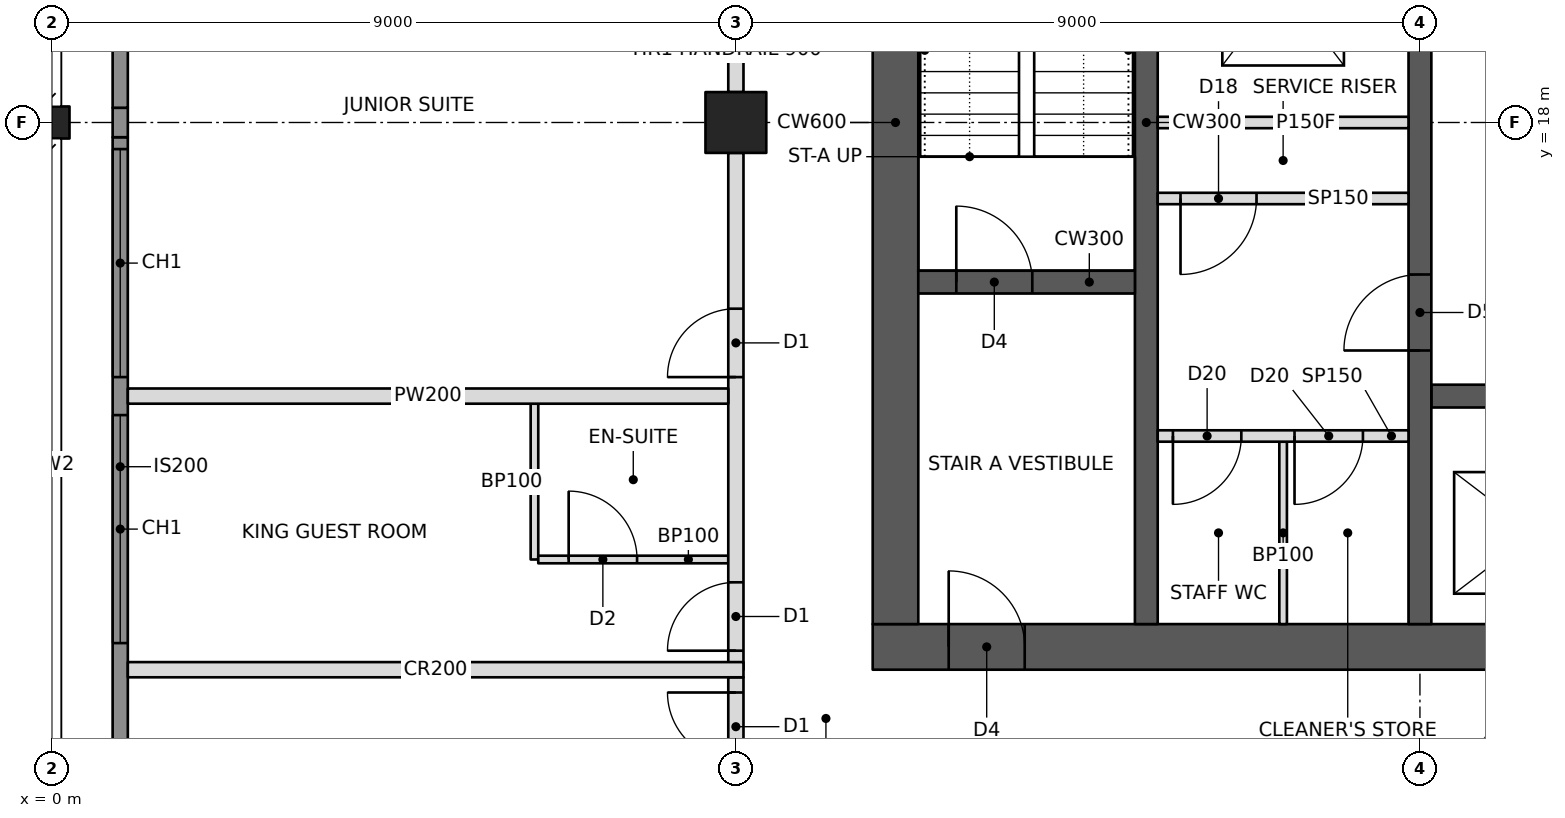
"""IFC4 building model, lengths in metres.
Left out: names, types, materials, properties, quantities, classifications, styles, units other than length and angle.
Written with IfcOpenShell. Run it as: python <this file> out.ifc"""

import sys

from ifc_helpers import new_model, si_unit, direction, frame, frame_2d, origin, origin_2d, place, context, subcontext, project, spatial, rectangle, hollow_rectangle, i_section, extrude, element, fill, save


model = new_model("IFC4")
c1 = context("Model", 3, precision=1e-05, world=origin(), true_north=direction((0.0, 1.0)))
c2 = subcontext(c1, "Body", "Model", "MODEL_VIEW")
j1 = project(units=[si_unit("LENGTHUNIT", "METRE"), si_unit("PLANEANGLEUNIT", "RADIAN")], contexts=[c1])
p1 = place(None, origin())
s1 = spatial("IfcSite", under=j1, at=p1, CompositionType="ELEMENT")
p2 = place(p1, origin())
s2 = spatial("IfcBuilding", under=s1, at=p2, CompositionType="ELEMENT")
p3 = place(p2, frame((0.0, 0.0, 244.6)))
s3 = spatial("IfcBuildingStorey", under=s2, at=p3, CompositionType="ELEMENT", Elevation=244.6)
p4 = place(p3, frame((0.0, 18.0, 0.0), z_axis=(0.0, 0.0, 1.0), x_axis=(0.0, 1.0, 0.0)))
e1 = element("IfcColumn", 1, at=p4, inside=s3, PredefinedType="COLUMN", context=c2, shape_type="SweptSolid", body=[
    extrude(i_section(OverallWidth=0.422, OverallDepth=0.465, WebThickness=0.045, FlangeThickness=0.073, at=origin_2d()), origin(), (0.0, 0.0, 1.0), 3.6),
])
p5 = place(p3, frame((9.0, 18.0, 0.0), z_axis=(0.0, 0.0, 1.0), x_axis=(1.0, 0.0, 0.0)))
e2 = element("IfcColumn", 2, at=p5, inside=s3, PredefinedType="COLUMN", context=c2, shape_type="SweptSolid", body=[
    extrude(hollow_rectangle(XDim=0.8, YDim=0.8, WallThickness=0.04, at=origin_2d()), origin(), (0.0, 0.0, 1.0), 3.6),
])
p6 = place(p3, frame((10.8, 11.1, 0.0), z_axis=(0.0, 0.0, 1.0), x_axis=(1.0, 0.0, 0.0)))
e3 = element("IfcWall", 3, at=p6, inside=s3, PredefinedType="SHEAR", context=c2, shape_type="SweptSolid", body=[
    extrude(rectangle(XDim=23.4, YDim=0.6, at=frame_2d((11.7, 0.0))), origin(), (0.0, 0.0, 1.0), 3.6),
])
p7 = place(p6, frame((1.0, 0.0, 0.0)))
e4 = element("IfcOpeningElement", 4, at=p7, cuts=e3, PredefinedType="OPENING", context=c2, shape_type="SweptSolid", body=[
    extrude(rectangle(XDim=1.0, YDim=2.1, at=frame_2d((0.5, 1.05))), frame((0.0, 0.31, 0.0), z_axis=(0.0, -1.0, 0.0), x_axis=(1.0, 0.0, 0.0)), (0.0, 0.0, 1.0), 0.62),
])
p8 = place(p6, frame((17.2, 0.0, 0.0)))
e5 = element("IfcOpeningElement", 5, at=p8, cuts=e3, PredefinedType="OPENING", context=c2, shape_type="SweptSolid", body=[
    extrude(rectangle(XDim=1.8, YDim=2.1, at=frame_2d((0.9, 1.05))), frame((0.0, 0.31, 0.0), z_axis=(0.0, -1.0, 0.0), x_axis=(1.0, 0.0, 0.0)), (0.0, 0.0, 1.0), 0.62),
])
p9 = place(p3, frame((11.1, 11.4, 0.0), z_axis=(0.0, 0.0, 1.0), x_axis=(0.0, 1.0, 0.0)))
e6 = element("IfcWall", 6, at=p9, inside=s3, PredefinedType="SHEAR", context=c2, shape_type="SweptSolid", body=[
    extrude(rectangle(XDim=13.2, YDim=0.6, at=frame_2d((6.6, 0.0))), origin(), (0.0, 0.0, 1.0), 3.6),
])
p10 = place(p3, frame((14.4, 11.4, 0.0), z_axis=(0.0, 0.0, 1.0), x_axis=(0.0, 1.0, 0.0)))
e7 = element("IfcWall", 7, at=p10, inside=s3, PredefinedType="SHEAR", context=c2, shape_type="SweptSolid", body=[
    extrude(rectangle(XDim=13.2, YDim=0.3, at=frame_2d((6.6, 0.0))), origin(), (0.0, 0.0, 1.0), 3.6),
])
p11 = place(p3, frame((11.4, 15.9, 0.0), z_axis=(0.0, 0.0, 1.0), x_axis=(1.0, 0.0, 0.0)))
e8 = element("IfcWall", 8, at=p11, inside=s3, PredefinedType="SHEAR", context=c2, shape_type="SweptSolid", body=[
    extrude(rectangle(XDim=2.85, YDim=0.3, at=frame_2d((1.425, 0.0))), origin(), (0.0, 0.0, 1.0), 3.6),
])
p12 = place(p11, frame((0.5, 0.0, 0.0)))
e9 = element("IfcOpeningElement", 9, at=p12, cuts=e8, PredefinedType="OPENING", context=c2, shape_type="SweptSolid", body=[
    extrude(rectangle(XDim=1.0, YDim=2.1, at=frame_2d((0.5, 1.05))), frame((0.0, 0.16, 0.0), z_axis=(0.0, -1.0, 0.0), x_axis=(1.0, 0.0, 0.0)), (0.0, 0.0, 1.0), 0.32),
])
p13 = place(p3, frame((18.0, 11.4, 0.0), z_axis=(0.0, 0.0, 1.0), x_axis=(0.0, 1.0, 0.0)))
e10 = element("IfcWall", 10, at=p13, inside=s3, PredefinedType="SHEAR", context=c2, shape_type="SweptSolid", body=[
    extrude(rectangle(XDim=13.2, YDim=0.3, at=frame_2d((6.6, 0.0))), origin(), (0.0, 0.0, 1.0), 3.6),
])
p14 = place(p13, frame((3.6, 0.0, 0.0)))
e11 = element("IfcOpeningElement", 11, at=p14, cuts=e10, PredefinedType="OPENING", context=c2, shape_type="SweptSolid", body=[
    extrude(rectangle(XDim=1.0, YDim=2.1, at=frame_2d((0.5, 1.05))), frame((0.0, 0.16, 0.0), z_axis=(0.0, -1.0, 0.0), x_axis=(1.0, 0.0, 0.0)), (0.0, 0.0, 1.0), 0.32),
])
p15 = place(p13, frame((7.85, 0.0, 0.0)))
e12 = element("IfcOpeningElement", 12, at=p15, cuts=e10, PredefinedType="OPENING", context=c2, shape_type="SweptSolid", body=[
    extrude(rectangle(XDim=1.1, YDim=2.1, at=frame_2d((0.55, 1.05))), frame((0.0, 0.16, 0.0), z_axis=(0.0, -1.0, 0.0), x_axis=(1.0, 0.0, 0.0)), (0.0, 0.0, 1.0), 0.32),
])
p16 = place(p3, frame((14.55, 18.0, 0.0), z_axis=(0.0, 0.0, 1.0), x_axis=(1.0, 0.0, 0.0)))
e13 = element("IfcWall", 13, at=p16, inside=s3, PredefinedType="PARTITIONING", context=c2, shape_type="SweptSolid", body=[
    extrude(rectangle(XDim=3.3, YDim=0.15, at=frame_2d((1.65, 0.0))), origin(), (0.0, 0.0, 1.0), 3.4),
])
p17 = place(p3, frame((18.15, 14.4, 0.0), z_axis=(0.0, 0.0, 1.0), x_axis=(1.0, 0.0, 0.0)))
e14 = element("IfcWall", 14, at=p17, inside=s3, PredefinedType="SHEAR", context=c2, shape_type="SweptSolid", body=[
    extrude(rectangle(XDim=9.0, YDim=0.3, at=frame_2d((4.5, 0.0))), origin(), (0.0, 0.0, 1.0), 3.6),
])
p18 = place(p17, frame((0.8, 0.0, 0.0)))
e15 = element("IfcOpeningElement", 15, at=p18, cuts=e14, PredefinedType="OPENING", context=c2, shape_type="SweptSolid", body=[
    extrude(rectangle(XDim=1.1, YDim=2.1, at=frame_2d((0.55, 1.05))), frame((0.0, 0.16, 0.0), z_axis=(0.0, -1.0, 0.0), x_axis=(1.0, 0.0, 0.0)), (0.0, 0.0, 1.0), 0.32),
])
p19 = place(p17, frame((6.75, 0.0, 0.0)))
e16 = element("IfcOpeningElement", 16, at=p19, cuts=e14, PredefinedType="OPENING", context=c2, shape_type="SweptSolid", body=[
    extrude(rectangle(XDim=1.2, YDim=2.1, at=frame_2d((0.6, 1.05))), frame((0.0, 0.16, 0.0), z_axis=(0.0, -1.0, 0.0), x_axis=(1.0, 0.0, 0.0)), (0.0, 0.0, 1.0), 0.32),
])
p20 = place(p17, frame((3.8, 0.0, 0.0)))
e17 = element("IfcOpeningElement", 17, at=p20, cuts=e14, PredefinedType="OPENING", context=c2, shape_type="SweptSolid", body=[
    extrude(rectangle(XDim=1.1, YDim=2.1, at=frame_2d((0.55, 1.05))), frame((0.0, 0.16, 0.0), z_axis=(0.0, -1.0, 0.0), x_axis=(1.0, 0.0, 0.0)), (0.0, 0.0, 1.0), 0.32),
])
p21 = place(p3, frame((9.0, 10.8, 0.0), z_axis=(0.0, 0.0, 1.0), x_axis=(0.0, 1.0, 0.0)))
e18 = element("IfcWall", 18, at=p21, inside=s3, PredefinedType="PARTITIONING", context=c2, shape_type="SweptSolid", body=[
    extrude(rectangle(XDim=6.8, YDim=0.2, at=frame_2d((3.4, 0.0))), origin(), (0.0, 0.0, 1.0), 2.605),
])
p22 = place(p21, frame((0.25, 0.0, 0.0)))
e19 = element("IfcOpeningElement", 19, at=p22, cuts=e18, PredefinedType="OPENING", context=c2, shape_type="SweptSolid", body=[
    extrude(rectangle(XDim=0.9, YDim=2.1, at=frame_2d((0.45, 1.05))), frame((0.0, 0.11, 0.0), z_axis=(0.0, -1.0, 0.0), x_axis=(1.0, 0.0, 0.0)), (0.0, 0.0, 1.0), 0.22),
])
p23 = place(p21, frame((3.85, 0.0, 0.0)))
e20 = element("IfcOpeningElement", 20, at=p23, cuts=e18, PredefinedType="OPENING", context=c2, shape_type="SweptSolid", body=[
    extrude(rectangle(XDim=0.9, YDim=2.1, at=frame_2d((0.45, 1.05))), frame((0.0, 0.11, 0.0), z_axis=(0.0, -1.0, 0.0), x_axis=(1.0, 0.0, 0.0)), (0.0, 0.0, 1.0), 0.22),
])
p24 = place(p3, frame((9.0, 18.4, 0.0), z_axis=(0.0, 0.0, 1.0), x_axis=(0.0, 1.0, 0.0)))
e21 = element("IfcWall", 21, at=p24, inside=s3, PredefinedType="PARTITIONING", context=c2, shape_type="SweptSolid", body=[
    extrude(rectangle(XDim=8.2, YDim=0.2, at=frame_2d((4.1, 0.0))), origin(), (0.0, 0.0, 1.0), 2.605),
])
p25 = place(p3, frame((1.0, 10.8, 0.0), z_axis=(0.0, 0.0, 1.0), x_axis=(1.0, 0.0, 0.0)))
e22 = element("IfcWall", 22, at=p25, inside=s3, PredefinedType="PARTITIONING", context=c2, shape_type="SweptSolid", body=[
    extrude(rectangle(XDim=8.1, YDim=0.2, at=frame_2d((4.05, 0.0))), origin(), (0.0, 0.0, 1.0), 2.604),
])
p26 = place(p3, frame((8.9, 14.4, 0.0), z_axis=(0.0, 0.0, 1.0), x_axis=(-1.0, 0.0, 0.0)))
e23 = element("IfcWall", 23, at=p26, inside=s3, PredefinedType="PARTITIONING", context=c2, shape_type="SweptSolid", body=[
    extrude(rectangle(XDim=7.9, YDim=0.2, at=frame_2d((3.95, 0.0))), origin(), (0.0, 0.0, 1.0), 2.604),
])
p27 = place(p3, frame((6.35, 12.25, 0.0), z_axis=(0.0, 0.0, 1.0), x_axis=(0.0, 1.0, 0.0)))
e24 = element("IfcWall", 24, at=p27, inside=s3, PredefinedType="PARTITIONING", context=c2, shape_type="SweptSolid", body=[
    extrude(rectangle(XDim=2.05, YDim=0.1, at=frame_2d((1.025, 0.0))), origin(), (0.0, 0.0, 1.0), 3.4),
])
p28 = place(p3, frame((8.9, 12.25, 0.0), z_axis=(0.0, 0.0, 1.0), x_axis=(-1.0, 0.0, 0.0)))
e25 = element("IfcWall", 25, at=p28, inside=s3, PredefinedType="PARTITIONING", context=c2, shape_type="SweptSolid", body=[
    extrude(rectangle(XDim=2.5, YDim=0.1, at=frame_2d((1.25, 0.0))), origin(), (0.0, 0.0, 1.0), 2.604),
])
p29 = place(p28, frame((1.2, 0.0, 0.0)))
e26 = element("IfcOpeningElement", 26, at=p29, cuts=e25, PredefinedType="OPENING", context=c2, shape_type="SweptSolid", body=[
    extrude(rectangle(XDim=0.9, YDim=2.1, at=frame_2d((0.45, 1.05))), frame((0.0, 0.06, 0.0), z_axis=(0.0, -1.0, 0.0), x_axis=(1.0, 0.0, 0.0)), (0.0, 0.0, 1.0), 0.12),
])
p30 = place(p3, frame((9.0, 9.4, 0.0), z_axis=(0.0, 0.0, 1.0), x_axis=(0.0, 1.0, 0.0)))
e27 = element("IfcWall", 27, at=p30, inside=s3, PredefinedType="PARTITIONING", context=c2, shape_type="SweptSolid", body=[
    extrude(rectangle(XDim=1.3, YDim=0.2, at=frame_2d((0.65, 0.0))), origin(), (0.0, 0.0, 1.0), 2.605),
])
p31 = place(p30, frame((0.2, 0.0, 0.0)))
e28 = element("IfcOpeningElement", 28, at=p31, cuts=e27, PredefinedType="OPENING", context=c2, shape_type="SweptSolid", body=[
    extrude(rectangle(XDim=0.9, YDim=2.1, at=frame_2d((0.45, 1.05))), frame((0.0, 0.11, 0.0), z_axis=(0.0, -1.0, 0.0), x_axis=(1.0, 0.0, 0.0)), (0.0, 0.0, 1.0), 0.22),
])
p32 = place(p3, frame((14.55, 17.0, 0.0), z_axis=(0.0, 0.0, 1.0), x_axis=(1.0, 0.0, 0.0)))
e29 = element("IfcWall", 29, at=p32, inside=s3, PredefinedType="PARTITIONING", context=c2, shape_type="SweptSolid", body=[
    extrude(rectangle(XDim=3.3, YDim=0.15, at=frame_2d((1.65, 0.0))), origin(), (0.0, 0.0, 1.0), 3.4),
])
p33 = place(p32, frame((0.3, 0.0, 0.0)))
e30 = element("IfcOpeningElement", 30, at=p33, cuts=e29, PredefinedType="OPENING", context=c2, shape_type="SweptSolid", body=[
    extrude(rectangle(XDim=1.0, YDim=2.1, at=frame_2d((0.5, 1.05))), frame((0.0, 0.085, 0.0), z_axis=(0.0, -1.0, 0.0), x_axis=(1.0, 0.0, 0.0)), (0.0, 0.0, 1.0), 0.17),
])
p34 = place(p3, frame((14.55, 13.875, 0.0), z_axis=(0.0, 0.0, 1.0), x_axis=(1.0, 0.0, 0.0)))
e31 = element("IfcWall", 31, at=p34, inside=s3, PredefinedType="PARTITIONING", context=c2, shape_type="SweptSolid", body=[
    extrude(rectangle(XDim=3.3, YDim=0.15, at=frame_2d((1.65, 0.0))), origin(), (0.0, 0.0, 1.0), 3.4),
])
p35 = place(p34, frame((0.2, 0.0, 0.0)))
e32 = element("IfcOpeningElement", 32, at=p35, cuts=e31, PredefinedType="OPENING", context=c2, shape_type="SweptSolid", body=[
    extrude(rectangle(XDim=0.9, YDim=2.1, at=frame_2d((0.45, 1.05))), frame((0.0, 0.085, 0.0), z_axis=(0.0, -1.0, 0.0), x_axis=(1.0, 0.0, 0.0)), (0.0, 0.0, 1.0), 0.17),
])
p36 = place(p34, frame((1.8, 0.0, 0.0)))
e33 = element("IfcOpeningElement", 33, at=p36, cuts=e31, PredefinedType="OPENING", context=c2, shape_type="SweptSolid", body=[
    extrude(rectangle(XDim=0.9, YDim=2.1, at=frame_2d((0.45, 1.05))), frame((0.0, 0.085, 0.0), z_axis=(0.0, -1.0, 0.0), x_axis=(1.0, 0.0, 0.0)), (0.0, 0.0, 1.0), 0.17),
])
p37 = place(p3, frame((16.2, 11.4, 0.0), z_axis=(0.0, 0.0, 1.0), x_axis=(0.0, 1.0, 0.0)))
e34 = element("IfcWall", 34, at=p37, inside=s3, PredefinedType="PARTITIONING", context=c2, shape_type="SweptSolid", body=[
    extrude(rectangle(XDim=2.4, YDim=0.1, at=frame_2d((1.2, 0.0))), origin(), (0.0, 0.0, 1.0), 3.4),
])
p38 = place(p3, frame((0.9, 9.135, 0.0), z_axis=(0.0, 0.0, 1.0), x_axis=(0.0, 1.0, 0.0)))
e35 = element("IfcWall", 35, at=p38, inside=s3, PredefinedType="SOLIDWALL", context=c2, shape_type="SweptSolid", body=[
    extrude(rectangle(XDim=8.671, YDim=0.2, at=frame_2d((4.335, 0.0))), origin(), (0.0, 0.0, 1.0), 3.4),
])
p39 = place(p38, frame((2.015, 0.0, 0.6)))
e36 = element("IfcOpeningElement", 36, at=p39, cuts=e35, PredefinedType="OPENING", context=c2, shape_type="SweptSolid", body=[
    extrude(rectangle(XDim=3.0, YDim=2.2, at=frame_2d((1.5, 1.1))), frame((0.0, 0.11, 0.0), z_axis=(0.0, -1.0, 0.0), x_axis=(1.0, 0.0, 0.0)), (0.0, 0.0, 1.0), 0.22),
])
p40 = place(p38, frame((5.515, 0.0, 0.6)))
e37 = element("IfcOpeningElement", 37, at=p40, cuts=e35, PredefinedType="OPENING", context=c2, shape_type="SweptSolid", body=[
    extrude(rectangle(XDim=3.0, YDim=2.2, at=frame_2d((1.5, 1.1))), frame((0.0, 0.11, 0.0), z_axis=(0.0, -1.0, 0.0), x_axis=(1.0, 0.0, 0.0)), (0.0, 0.0, 1.0), 0.22),
])
p41 = place(p3, frame((0.9, 17.806, 0.0), z_axis=(0.0, 0.0, 1.0), x_axis=(0.0, 1.0, 0.0)))
e38 = element("IfcWall", 38, at=p41, inside=s3, PredefinedType="SOLIDWALL", context=c2, shape_type="SweptSolid", body=[
    extrude(rectangle(XDim=0.388, YDim=0.2, at=frame_2d((0.194, 0.0))), origin(), (0.0, 0.0, 1.0), 2.604),
])
p42 = place(p3, frame((0.9, 18.194, 0.0), z_axis=(0.0, 0.0, 1.0), x_axis=(0.0, 1.0, 0.0)))
e39 = element("IfcWall", 39, at=p42, inside=s3, PredefinedType="SOLIDWALL", context=c2, shape_type="SweptSolid", body=[
    extrude(rectangle(XDim=5.806, YDim=0.2, at=frame_2d((2.903, 0.0))), origin(), (0.0, 0.0, 1.0), 3.4),
])
p43 = place(p42, frame((1.356, 0.0, 0.6)))
e40 = element("IfcOpeningElement", 40, at=p43, cuts=e39, PredefinedType="OPENING", context=c2, shape_type="SweptSolid", body=[
    extrude(rectangle(XDim=3.0, YDim=2.2, at=frame_2d((1.5, 1.1))), frame((0.0, 0.11, 0.0), z_axis=(0.0, -1.0, 0.0), x_axis=(1.0, 0.0, 0.0)), (0.0, 0.0, 1.0), 0.22),
])
p44 = place(p39, origin())
e41 = element("IfcWindow", 41, at=p44, inside=s3, PartitioningType="TRIPLE_PANEL_VERTICAL", PredefinedType="WINDOW", context=c2, shape_type="SweptSolid", body=[
    extrude(rectangle(XDim=3.0, YDim=2.2, at=frame_2d((1.5, 1.1))), frame((0.0, 0.03, 0.0), z_axis=(0.0, -1.0, 0.0), x_axis=(1.0, 0.0, 0.0)), (0.0, 0.0, 1.0), 0.06),
])
fill(e36, e41)
p45 = place(p40, origin())
e42 = element("IfcWindow", 42, at=p45, inside=s3, PartitioningType="TRIPLE_PANEL_VERTICAL", PredefinedType="WINDOW", context=c2, shape_type="SweptSolid", body=[
    extrude(rectangle(XDim=3.0, YDim=2.2, at=frame_2d((1.5, 1.1))), frame((0.0, 0.03, 0.0), z_axis=(0.0, -1.0, 0.0), x_axis=(1.0, 0.0, 0.0)), (0.0, 0.0, 1.0), 0.06),
])
fill(e37, e42)
p46 = place(p29, frame((0.9, 0.0, 0.0), z_axis=(0.0, 0.0, 1.0), x_axis=(-1.0, 0.0, 0.0)))
e43 = element("IfcDoor", 43, at=p46, inside=s3, OperationType="SINGLE_SWING_LEFT", PredefinedType="DOOR", context=c2, shape_type="SweptSolid", body=[
    extrude(rectangle(XDim=0.9, YDim=2.1, at=frame_2d((0.45, 1.05))), frame((0.0, 0.025, 0.0), z_axis=(0.0, -1.0, 0.0), x_axis=(1.0, 0.0, 0.0)), (0.0, 0.0, 1.0), 0.05),
])
fill(e26, e43)
p47 = place(p22, origin())
e44 = element("IfcDoor", 44, at=p47, inside=s3, OperationType="SINGLE_SWING_LEFT", PredefinedType="DOOR", context=c2, shape_type="SweptSolid", body=[
    extrude(rectangle(XDim=0.9, YDim=2.1, at=frame_2d((0.45, 1.05))), frame((0.0, 0.025, 0.0), z_axis=(0.0, -1.0, 0.0), x_axis=(1.0, 0.0, 0.0)), (0.0, 0.0, 1.0), 0.05),
])
fill(e19, e44)
p48 = place(p23, origin())
e45 = element("IfcDoor", 45, at=p48, inside=s3, OperationType="SINGLE_SWING_LEFT", PredefinedType="DOOR", context=c2, shape_type="SweptSolid", body=[
    extrude(rectangle(XDim=0.9, YDim=2.1, at=frame_2d((0.45, 1.05))), frame((0.0, 0.025, 0.0), z_axis=(0.0, -1.0, 0.0), x_axis=(1.0, 0.0, 0.0)), (0.0, 0.0, 1.0), 0.05),
])
fill(e20, e45)
p49 = place(p31, origin())
e46 = element("IfcDoor", 46, at=p49, inside=s3, OperationType="SINGLE_SWING_RIGHT", PredefinedType="DOOR", context=c2, shape_type="SweptSolid", body=[
    extrude(rectangle(XDim=0.9, YDim=2.1, at=frame_2d((0.45, 1.05))), frame((0.0, 0.025, 0.0), z_axis=(0.0, -1.0, 0.0), x_axis=(1.0, 0.0, 0.0)), (0.0, 0.0, 1.0), 0.05),
])
fill(e28, e46)
p50 = place(p33, frame((1.0, 0.0, 0.0), z_axis=(0.0, 0.0, 1.0), x_axis=(-1.0, 0.0, 0.0)))
e47 = element("IfcDoor", 47, at=p50, inside=s3, OperationType="SINGLE_SWING_RIGHT", PredefinedType="DOOR", context=c2, shape_type="SweptSolid", body=[
    extrude(rectangle(XDim=1.0, YDim=2.1, at=frame_2d((0.5, 1.05))), frame((0.0, 0.025, 0.0), z_axis=(0.0, -1.0, 0.0), x_axis=(1.0, 0.0, 0.0)), (0.0, 0.0, 1.0), 0.05),
])
fill(e30, e47)
p51 = place(p35, frame((0.9, 0.0, 0.0), z_axis=(0.0, 0.0, 1.0), x_axis=(-1.0, 0.0, 0.0)))
e48 = element("IfcDoor", 48, at=p51, inside=s3, OperationType="SINGLE_SWING_RIGHT", PredefinedType="DOOR", context=c2, shape_type="SweptSolid", body=[
    extrude(rectangle(XDim=0.9, YDim=2.1, at=frame_2d((0.45, 1.05))), frame((0.0, 0.025, 0.0), z_axis=(0.0, -1.0, 0.0), x_axis=(1.0, 0.0, 0.0)), (0.0, 0.0, 1.0), 0.05),
])
fill(e32, e48)
p52 = place(p36, frame((0.9, 0.0, 0.0), z_axis=(0.0, 0.0, 1.0), x_axis=(-1.0, 0.0, 0.0)))
e49 = element("IfcDoor", 49, at=p52, inside=s3, OperationType="SINGLE_SWING_RIGHT", PredefinedType="DOOR", context=c2, shape_type="SweptSolid", body=[
    extrude(rectangle(XDim=0.9, YDim=2.1, at=frame_2d((0.45, 1.05))), frame((0.0, 0.025, 0.0), z_axis=(0.0, -1.0, 0.0), x_axis=(1.0, 0.0, 0.0)), (0.0, 0.0, 1.0), 0.05),
])
fill(e33, e49)
p53 = place(p7, origin())
e50 = element("IfcDoor", 50, at=p53, inside=s3, OperationType="SINGLE_SWING_LEFT", PredefinedType="DOOR", context=c2, shape_type="SweptSolid", body=[
    extrude(rectangle(XDim=1.0, YDim=2.1, at=frame_2d((0.5, 1.05))), frame((0.0, 0.025, 0.0), z_axis=(0.0, -1.0, 0.0), x_axis=(1.0, 0.0, 0.0)), (0.0, 0.0, 1.0), 0.05),
])
fill(e4, e50)
p54 = place(p12, origin())
e51 = element("IfcDoor", 51, at=p54, inside=s3, OperationType="SINGLE_SWING_LEFT", PredefinedType="DOOR", context=c2, shape_type="SweptSolid", body=[
    extrude(rectangle(XDim=1.0, YDim=2.1, at=frame_2d((0.5, 1.05))), frame((0.0, 0.025, 0.0), z_axis=(0.0, -1.0, 0.0), x_axis=(1.0, 0.0, 0.0)), (0.0, 0.0, 1.0), 0.05),
])
fill(e9, e51)
p55 = place(p14, origin())
e52 = element("IfcDoor", 52, at=p55, inside=s3, OperationType="SINGLE_SWING_LEFT", PredefinedType="DOOR", context=c2, shape_type="SweptSolid", body=[
    extrude(rectangle(XDim=1.0, YDim=2.1, at=frame_2d((0.5, 1.05))), frame((0.0, 0.025, 0.0), z_axis=(0.0, -1.0, 0.0), x_axis=(1.0, 0.0, 0.0)), (0.0, 0.0, 1.0), 0.05),
])
fill(e11, e52)
save(model, sys.argv[1])
